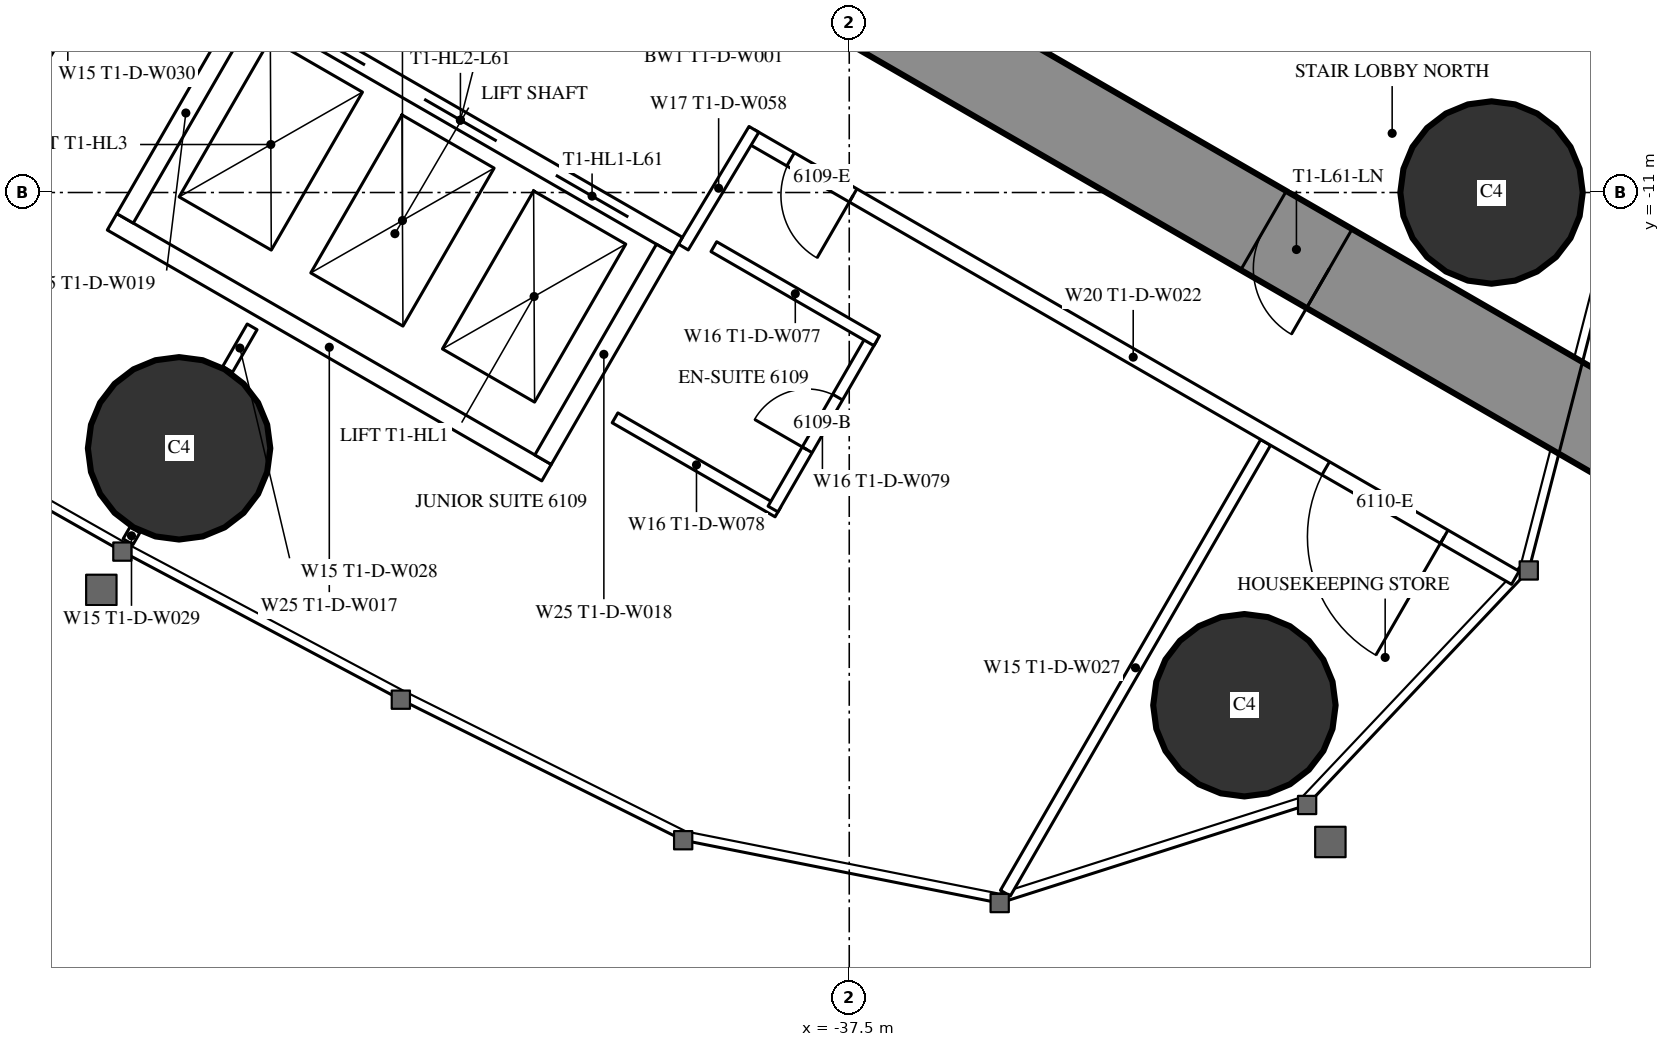
"""IFC4 building model, lengths in metres.
Left out: names, types, materials, properties, quantities, classifications, styles, units other than length and angle.
Written with IfcOpenShell. Run it as: python <this file> out.ifc"""

import sys

from ifc_helpers import new_model, si_unit, direction, frame, frame_2d, origin, origin_2d, place, context, subcontext, project, spatial, rectangle, circle, extrude, element, fill, save


model = new_model("IFC4")
c1 = context("Model", 3, precision=1e-05, world=origin(), true_north=direction((0.0, 1.0)))
c2 = subcontext(c1, "Body", "Model", "MODEL_VIEW")
j1 = project(units=[si_unit("LENGTHUNIT", "METRE"), si_unit("PLANEANGLEUNIT", "RADIAN")], contexts=[c1])
p1 = place(None, origin())
s1 = spatial("IfcSite", under=j1, at=p1, CompositionType="ELEMENT")
p2 = place(p1, origin())
s2 = spatial("IfcBuilding", under=s1, at=p2, CompositionType="ELEMENT")
p3 = place(p2, frame((0.0, 0.0, 229.7)))
s3 = spatial("IfcBuildingStorey", under=s2, at=p3, CompositionType="ELEMENT", Elevation=229.7)
for number, where, z_axis, x_axis in (
    (1, (-32.301, -17.745, 0.0), (0.0, 0.0, 1.0), (1.0, 0.0, 0.0)),
    (2, (-29.05, -11.0, 0.0), (0.0, 0.0, 1.0), (1.0, 0.0, 0.0)),
    (3, (-46.317, -14.365, 0.0), (0.0, 0.0, 1.0), (1.0, 0.0, 0.0)),
):
    element("IfcColumn", number, at=place(p3, frame(where, z_axis=z_axis, x_axis=x_axis)), inside=s3, PredefinedType="COLUMN", context=c2, shape_type="SweptSolid", body=[
        extrude(circle(Radius=1.2, at=origin_2d()), origin(), (0.0, 0.0, 1.0), 3.6),
    ])
p4 = place(p3, frame((-27.2, -14.3, 0.0), z_axis=(0.0, 0.0, 1.0), x_axis=(-0.866024021859, 0.500002393557, 0.0)))
e4 = element("IfcWall", 4, at=p4, inside=s3, PredefinedType="SHEAR", context=c2, shape_type="SweptSolid", body=[
    extrude(rectangle(XDim=27.907, YDim=1.2, at=frame_2d((13.954, 0.0))), origin(), (0.0, 0.0, 1.0), 3.6),
])
p5 = place(p4, frame((4.6, 0.0, 0.0)))
e5 = element("IfcOpeningElement", 5, at=p5, cuts=e4, PredefinedType="OPENING", context=c2, shape_type="SweptSolid", body=[
    extrude(rectangle(XDim=1.0, YDim=2.2, at=frame_2d((0.5, 1.1))), frame((0.0, 0.61, 0.0), z_axis=(0.0, -1.0, 0.0), x_axis=(1.0, 0.0, 0.0)), (0.0, 0.0, 1.0), 1.22),
])
p6 = place(p4, frame((13.395, 0.0, 0.0)))
e6 = element("IfcOpeningElement", 6, at=p6, cuts=e4, PredefinedType="OPENING", context=c2, shape_type="SweptSolid", body=[
    extrude(rectangle(XDim=1.8, YDim=2.2, at=frame_2d((0.9, 1.1))), frame((0.0, 0.61, 0.0), z_axis=(0.0, -1.0, 0.0), x_axis=(1.0, 0.0, 0.0)), (0.0, 0.0, 1.0), 1.22),
])
p7 = place(p3, frame((-32.022, -14.287, 0.0), z_axis=(0.0, 0.0, 1.0), x_axis=(-0.50000019414, -0.866025291697, 0.0)))
e7 = element("IfcWall", 7, at=p7, inside=s3, PredefinedType="PARTITIONING", context=c2, shape_type="SweptSolid", body=[
    extrude(rectangle(XDim=6.848, YDim=0.15, at=frame_2d((3.424, 0.0))), origin(), (0.0, 0.0, 1.0), 3.35),
])
p8 = place(p3, frame((-46.898, -15.439, 0.0), z_axis=(0.0, 0.0, 1.0), x_axis=(-0.500232303069, -0.865891241997, 0.0)))
e8 = element("IfcWall", 8, at=p8, inside=s3, PredefinedType="PARTITIONING", context=c2, shape_type="SweptSolid", body=[
    extrude(rectangle(XDim=0.18, YDim=0.15, at=frame_2d((0.09, 0.0))), origin(), (0.0, 0.0, 1.0), 2.45),
])
p9 = place(p3, frame((-46.274, -6.059, 0.0), z_axis=(0.0, 0.0, 1.0), x_axis=(-0.500020471368, -0.866013584312, 0.0)))
e9 = element("IfcWall", 9, at=p9, inside=s3, PredefinedType="PARTITIONING", context=c2, shape_type="SweptSolid", body=[
    extrude(rectangle(XDim=6.028, YDim=0.15, at=frame_2d((3.014, 0.0))), origin(), (0.0, 0.0, 1.0), 2.45),
])
p10 = place(p3, frame((-45.356, -12.767, 0.0), z_axis=(0.0, 0.0, 1.0), x_axis=(-0.499886366516, -0.866091000168, 0.0)))
e10 = element("IfcWall", 10, at=p10, inside=s3, PredefinedType="PARTITIONING", context=c2, shape_type="SweptSolid", body=[
    extrude(rectangle(XDim=0.645, YDim=0.15, at=frame_2d((0.322, 0.0))), origin(), (0.0, 0.0, 1.0), 3.35),
])
p11 = place(p3, frame((-28.737, -16.068, 0.0), z_axis=(0.0, 0.0, 1.0), x_axis=(-0.866029399323, 0.49999307946, 0.0)))
e11 = element("IfcWall", 11, at=p11, inside=s3, PredefinedType="PARTITIONING", context=c2, shape_type="SweptSolid", body=[
    extrude(rectangle(XDim=11.61, YDim=0.2, at=frame_2d((5.805, 0.0))), origin(), (0.0, 0.0, 1.0), 3.35),
])
p12 = place(p11, frame((1.08, 0.0, 0.0)))
e12 = element("IfcOpeningElement", 12, at=p12, cuts=e11, PredefinedType="OPENING", context=c2, shape_type="SweptSolid", body=[
    extrude(rectangle(XDim=1.8, YDim=2.04, at=frame_2d((0.9, 1.02))), frame((0.0, 0.11, 0.0), z_axis=(0.0, -1.0, 0.0), x_axis=(1.0, 0.0, 0.0)), (0.0, 0.0, 1.0), 0.22),
])
p13 = place(p11, frame((10.06, 0.0, 0.0)))
e13 = element("IfcOpeningElement", 13, at=p13, cuts=e11, PredefinedType="OPENING", context=c2, shape_type="SweptSolid", body=[
    extrude(rectangle(XDim=0.95, YDim=2.2, at=frame_2d((0.475, 1.1))), frame((0.0, 0.11, 0.0), z_axis=(0.0, -1.0, 0.0), x_axis=(1.0, 0.0, 0.0)), (0.0, 0.0, 1.0), 0.22),
])
p14 = place(p3, frame((-39.683, -11.718, 0.0), z_axis=(0.0, 0.0, 1.0), x_axis=(0.514336634837, 0.857588377991, 0.0)))
e14 = element("IfcWall", 14, at=p14, inside=s3, PredefinedType="PARTITIONING", context=c2, shape_type="SweptSolid", body=[
    extrude(rectangle(XDim=1.805, YDim=0.15, at=frame_2d((0.903, 0.0))), origin(), (0.0, 0.0, 1.0), 3.35),
])
p15 = place(p3, frame((-38.438, -15.202, 0.0), z_axis=(0.0, 0.0, 1.0), x_axis=(-0.866073894602, 0.499916002032, 0.0)))
e15 = element("IfcWall", 15, at=p15, inside=s3, PredefinedType="PARTITIONING", context=c2, shape_type="SweptSolid", body=[
    extrude(rectangle(XDim=2.475, YDim=0.15, at=frame_2d((1.238, 0.0))), origin(), (0.0, 0.0, 1.0), 3.35),
])
p16 = place(p3, frame((-37.203, -12.913, 0.0), z_axis=(0.0, 0.0, 1.0), x_axis=(-0.500006934395, -0.866021400173, 0.0)))
e16 = element("IfcWall", 16, at=p16, inside=s3, PredefinedType="PARTITIONING", context=c2, shape_type="SweptSolid", body=[
    extrude(rectangle(XDim=2.6, YDim=0.15, at=frame_2d((1.3, 0.0))), origin(), (0.0, 0.0, 1.0), 3.35),
])
p17 = place(p16, frame((0.9, 0.0, 0.0)))
e17 = element("IfcOpeningElement", 17, at=p17, cuts=e16, PredefinedType="OPENING", context=c2, shape_type="SweptSolid", body=[
    extrude(rectangle(XDim=0.8, YDim=2.2, at=frame_2d((0.4, 1.1))), frame((0.0, 0.085, 0.0), z_axis=(0.0, -1.0, 0.0), x_axis=(1.0, 0.0, 0.0)), (0.0, 0.0, 1.0), 0.17),
])
p18 = place(p3, frame((-37.138, -12.95, 0.0), z_axis=(0.0, 0.0, 1.0), x_axis=(-0.866031185235, 0.4999899861, 0.0)))
e18 = element("IfcWall", 18, at=p18, inside=s3, PredefinedType="PARTITIONING", context=c2, shape_type="SweptSolid", body=[
    extrude(rectangle(XDim=2.475, YDim=0.15, at=frame_2d((1.238, 0.0))), origin(), (0.0, 0.0, 1.0), 2.5),
])
p19 = place(p3, frame((-39.758, -11.697, 0.0), z_axis=(0.0, 0.0, 1.0), x_axis=(-0.866024194504, 0.500002094529, 0.0)))
e19 = element("IfcWall", 19, at=p19, inside=s3, PredefinedType="PARTITIONING", context=c2, shape_type="SweptSolid", body=[
    extrude(rectangle(XDim=6.6, YDim=0.25, at=frame_2d((3.3, 0.0))), origin(), (0.0, 0.0, 1.0), 3.35),
])
p20 = place(p19, frame((0.75, 0.0, 0.0)))
e20 = element("IfcOpeningElement", 20, at=p20, cuts=e19, PredefinedType="OPENING", context=c2, shape_type="SweptSolid", body=[
    extrude(rectangle(XDim=1.1, YDim=2.2, at=frame_2d((0.55, 1.1))), frame((0.0, 0.135, 0.0), z_axis=(0.0, -1.0, 0.0), x_axis=(1.0, 0.0, 0.0)), (0.0, 0.0, 1.0), 0.27),
])
p21 = place(p19, frame((2.75, 0.0, 0.0)))
e21 = element("IfcOpeningElement", 21, at=p21, cuts=e19, PredefinedType="OPENING", context=c2, shape_type="SweptSolid", body=[
    extrude(rectangle(XDim=1.1, YDim=2.2, at=frame_2d((0.55, 1.1))), frame((0.0, 0.135, 0.0), z_axis=(0.0, -1.0, 0.0), x_axis=(1.0, 0.0, 0.0)), (0.0, 0.0, 1.0), 0.27),
])
p22 = place(p19, frame((4.75, 0.0, 0.0)))
e22 = element("IfcOpeningElement", 22, at=p22, cuts=e19, PredefinedType="OPENING", context=c2, shape_type="SweptSolid", body=[
    extrude(rectangle(XDim=1.1, YDim=2.2, at=frame_2d((0.55, 1.1))), frame((0.0, 0.135, 0.0), z_axis=(0.0, -1.0, 0.0), x_axis=(1.0, 0.0, 0.0)), (0.0, 0.0, 1.0), 0.27),
])
p23 = place(p3, frame((-41.482, -14.686, 0.0), z_axis=(0.0, 0.0, 1.0), x_axis=(-0.86603344179, 0.499986077507, 0.0)))
e23 = element("IfcWall", 23, at=p23, inside=s3, PredefinedType="PARTITIONING", context=c2, shape_type="SweptSolid", body=[
    extrude(rectangle(XDim=6.6, YDim=0.25, at=frame_2d((3.3, 0.0))), origin(), (0.0, 0.0, 1.0), 3.35),
])
for number, where, z_axis, x_axis in (
    (24, (-39.928, -11.743, 0.0), (0.0, 0.0, 1.0), (-0.5, -0.866, 0.0)),
    (25, (-45.428, -8.568, 0.0), (0.0, 0.0, 1.0), (-0.5, -0.866, 0.0)),
):
    element("IfcWall", number, at=place(p3, frame(where, z_axis=z_axis, x_axis=x_axis)), inside=s3, PredefinedType="PARTITIONING", context=c2, shape_type="SweptSolid", body=[
        extrude(rectangle(XDim=3.201, YDim=0.25, at=frame_2d((1.6, 0.0))), origin(), (0.0, 0.0, 1.0), 3.35),
    ])
p24 = place(p12, origin())
e26 = element("IfcDoor", 26, at=p24, inside=s3, OperationType="DOUBLE_DOOR_SINGLE_SWING", PredefinedType="DOOR", context=c2, shape_type="SweptSolid", body=[
    extrude(rectangle(XDim=1.8, YDim=2.04, at=frame_2d((0.9, 1.02))), frame((0.0, 0.025, 0.0), z_axis=(0.0, -1.0, 0.0), x_axis=(1.0, 0.0, 0.0)), (0.0, 0.0, 1.0), 0.05),
])
fill(e12, e26)
p25 = place(p17, origin())
e27 = element("IfcDoor", 27, at=p25, inside=s3, OperationType="SINGLE_SWING_RIGHT", PredefinedType="DOOR", context=c2, shape_type="SweptSolid", body=[
    extrude(rectangle(XDim=0.8, YDim=2.2, at=frame_2d((0.4, 1.1))), frame((0.0, 0.025, 0.0), z_axis=(0.0, -1.0, 0.0), x_axis=(1.0, 0.0, 0.0)), (0.0, 0.0, 1.0), 0.05),
])
fill(e17, e27)
p26 = place(p13, origin())
e28 = element("IfcDoor", 28, at=p26, inside=s3, OperationType="SINGLE_SWING_LEFT", PredefinedType="DOOR", context=c2, shape_type="SweptSolid", body=[
    extrude(rectangle(XDim=0.95, YDim=2.2, at=frame_2d((0.475, 1.1))), frame((0.0, 0.025, 0.0), z_axis=(0.0, -1.0, 0.0), x_axis=(1.0, 0.0, 0.0)), (0.0, 0.0, 1.0), 0.05),
])
fill(e13, e28)
p27 = place(p5, origin())
e29 = element("IfcDoor", 29, at=p27, inside=s3, OperationType="SINGLE_SWING_LEFT", PredefinedType="DOOR", context=c2, shape_type="SweptSolid", body=[
    extrude(rectangle(XDim=1.0, YDim=2.2, at=frame_2d((0.5, 1.1))), frame((0.0, 0.025, 0.0), z_axis=(0.0, -1.0, 0.0), x_axis=(1.0, 0.0, 0.0)), (0.0, 0.0, 1.0), 0.05),
])
fill(e5, e29)
p28 = place(p20, origin())
e30 = element("IfcDoor", 30, at=p28, inside=s3, OperationType="DOUBLE_DOOR_SLIDING", PredefinedType="USERDEFINED", context=c2, shape_type="SweptSolid", body=[
    extrude(rectangle(XDim=1.1, YDim=2.2, at=frame_2d((0.55, 1.1))), frame((0.0, 0.025, 0.0), z_axis=(0.0, -1.0, 0.0), x_axis=(1.0, 0.0, 0.0)), (0.0, 0.0, 1.0), 0.05),
])
fill(e20, e30)
p29 = place(p21, origin())
e31 = element("IfcDoor", 31, at=p29, inside=s3, OperationType="DOUBLE_DOOR_SLIDING", PredefinedType="USERDEFINED", context=c2, shape_type="SweptSolid", body=[
    extrude(rectangle(XDim=1.1, YDim=2.2, at=frame_2d((0.55, 1.1))), frame((0.0, 0.025, 0.0), z_axis=(0.0, -1.0, 0.0), x_axis=(1.0, 0.0, 0.0)), (0.0, 0.0, 1.0), 0.05),
])
fill(e21, e31)
p30 = place(p22, origin())
e32 = element("IfcDoor", 32, at=p30, inside=s3, OperationType="DOUBLE_DOOR_SLIDING", PredefinedType="USERDEFINED", context=c2, shape_type="SweptSolid", body=[
    extrude(rectangle(XDim=1.1, YDim=2.2, at=frame_2d((0.55, 1.1))), frame((0.0, 0.025, 0.0), z_axis=(0.0, -1.0, 0.0), x_axis=(1.0, 0.0, 0.0)), (0.0, 0.0, 1.0), 0.05),
])
fill(e22, e32)
save(model, sys.argv[1])
